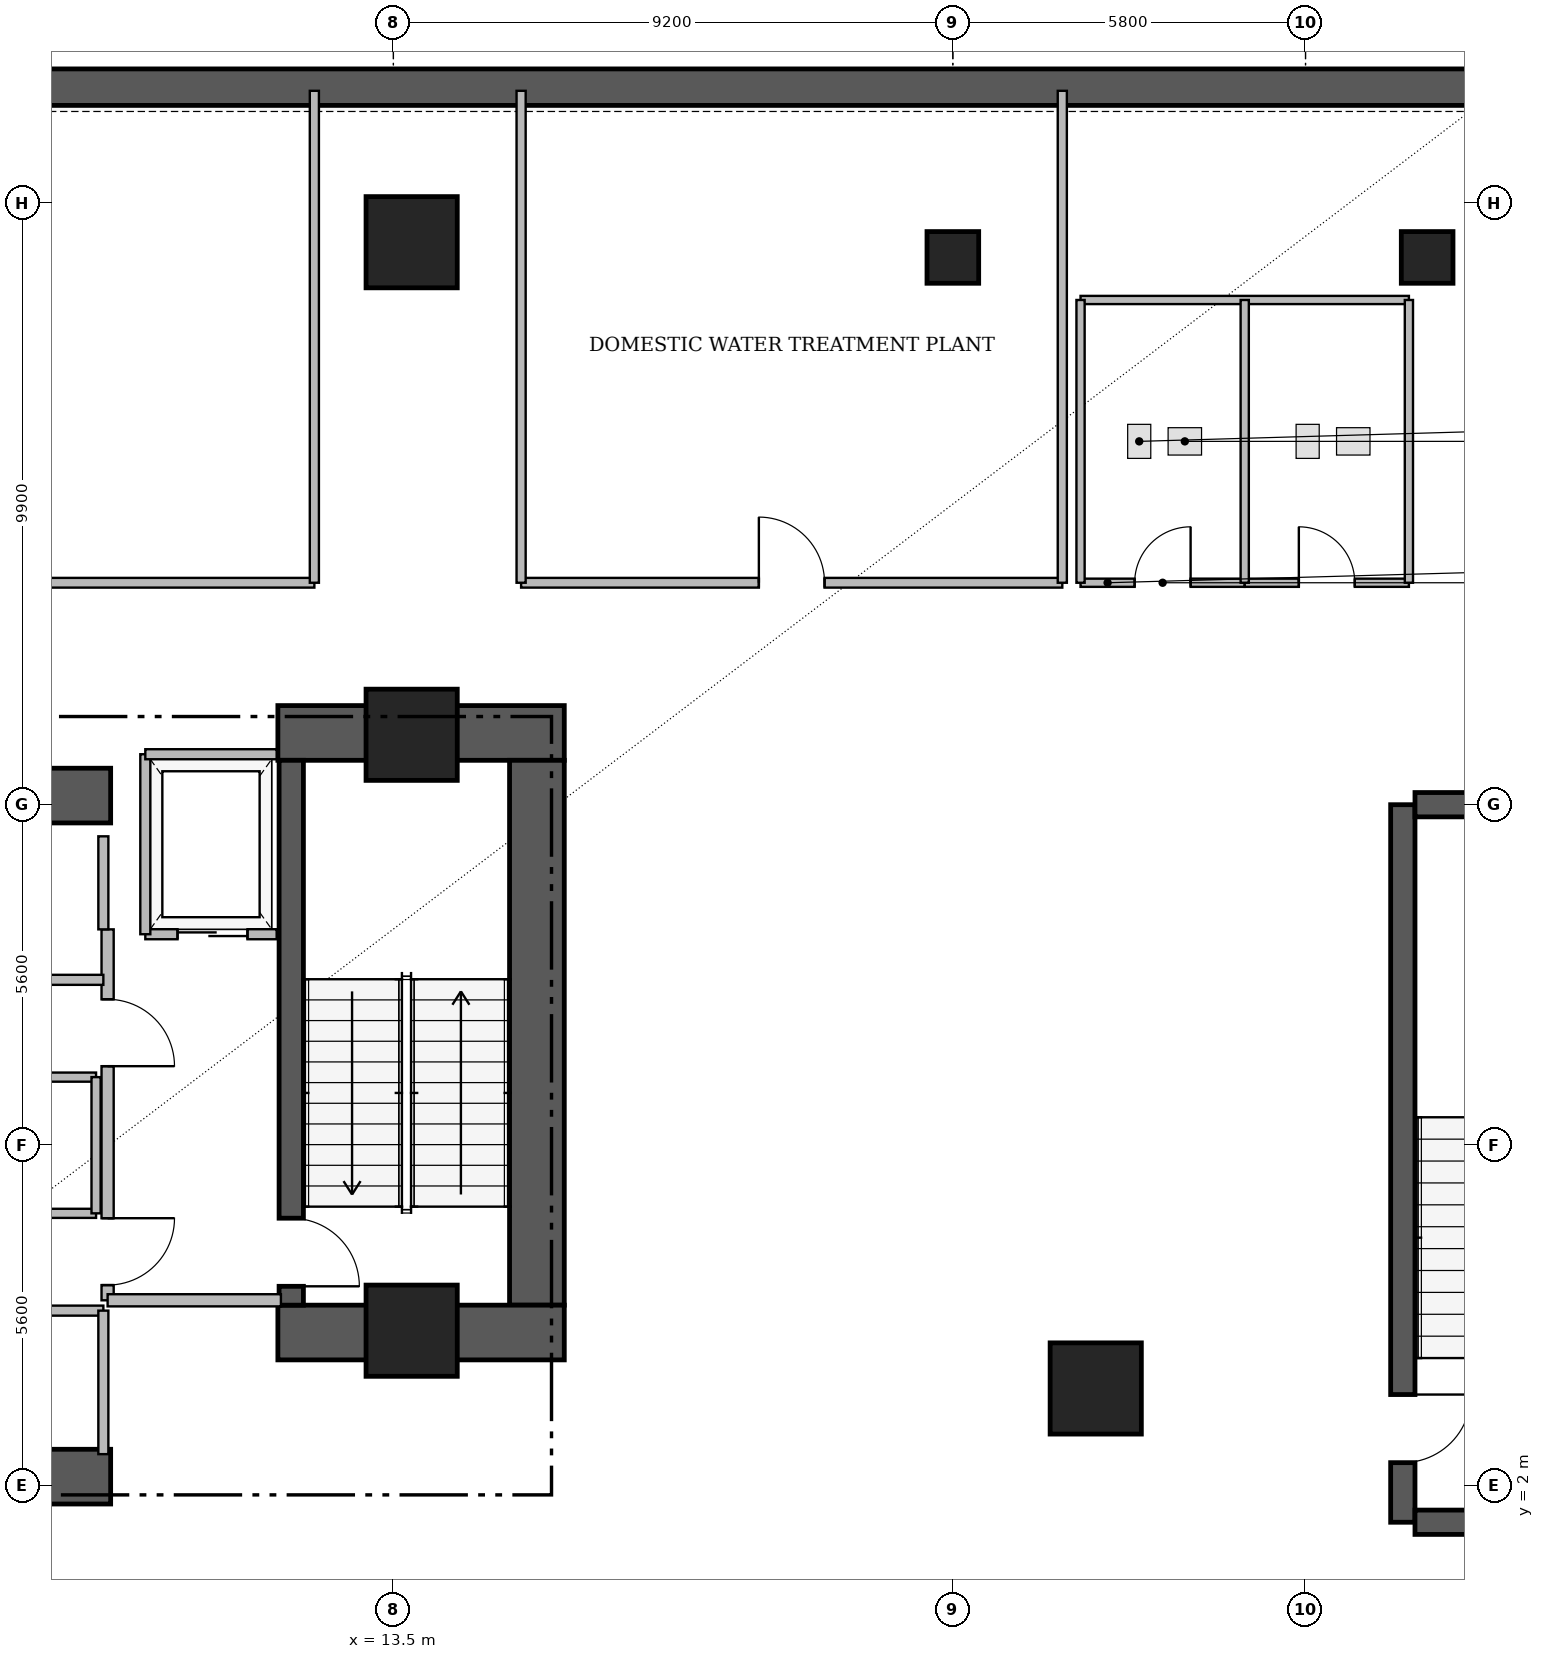
"""IFC4 building model, lengths in metres.
Left out: names, types, materials, properties, quantities, classifications, styles, units other than length and angle.
Written with IfcOpenShell. Run it as: python <this file> out.ifc"""

import sys

from ifc_helpers import new_model, si_unit, direction, frame, frame_2d, origin, origin_2d, place, context, subcontext, project, spatial, rectangle, extrude, element, fill, save


model = new_model("IFC4")
c1 = context("Model", 3, precision=1e-05, world=origin(), true_north=direction((0.0, 1.0)))
c2 = subcontext(c1, "Body", "Model", "MODEL_VIEW")
j1 = project(units=[si_unit("LENGTHUNIT", "METRE"), si_unit("PLANEANGLEUNIT", "RADIAN")], contexts=[c1])
p1 = place(None, origin())
s1 = spatial("IfcSite", under=j1, at=p1, CompositionType="ELEMENT")
p2 = place(p1, origin())
s2 = spatial("IfcBuilding", under=s1, at=p2, CompositionType="ELEMENT")
p3 = place(p2, frame((0.0, 0.0, -9.0)))
s3 = spatial("IfcBuildingStorey", under=s2, at=p3, CompositionType="ELEMENT", Elevation=-9.0)
p4 = place(p3, frame((-36.3, 25.0, 0.0), z_axis=(0.0, 0.0, 1.0), x_axis=(1.0, 0.0, 0.0)))
e1 = element("IfcWall", 1, at=p4, inside=s3, PredefinedType="USERDEFINED", context=c2, shape_type="SweptSolid", body=[
    extrude(rectangle(XDim=72.6, YDim=0.6, at=frame_2d((36.3, 0.0))), origin(), (0.0, 0.0, 1.0), 4.24),
])
p5 = place(p3, frame((11.6, 14.38, 0.0), z_axis=(0.0, 0.0, 1.0), x_axis=(1.0, 0.0, 0.0)))
e2 = element("IfcWall", 2, at=p5, inside=s3, PredefinedType="SHEAR", context=c2, shape_type="SweptSolid", body=[
    extrude(rectangle(XDim=4.71, YDim=0.9, at=frame_2d((2.355, 0.0))), origin(), (0.0, 0.0, 1.0), 4.31),
])
p6 = place(p3, frame((15.86, 4.97, 0.0), z_axis=(0.0, 0.0, 1.0), x_axis=(0.0, 1.0, 0.0)))
e3 = element("IfcWall", 3, at=p6, inside=s3, PredefinedType="SHEAR", context=c2, shape_type="SweptSolid", body=[
    extrude(rectangle(XDim=8.96, YDim=0.9, at=frame_2d((4.48, 0.0))), origin(), (0.0, 0.0, 1.0), 4.31),
])
p7 = place(p3, frame((11.6, 4.52, 0.0), z_axis=(0.0, 0.0, 1.0), x_axis=(1.0, 0.0, 0.0)))
e4 = element("IfcWall", 4, at=p7, inside=s3, PredefinedType="SHEAR", context=c2, shape_type="SweptSolid", body=[
    extrude(rectangle(XDim=4.71, YDim=0.9, at=frame_2d((2.355, 0.0))), origin(), (0.0, 0.0, 1.0), 4.31),
])
for number, where, z_axis, x_axis in (
    (5, (1.25, 2.15, 0.0), (0.0, 0.0, 1.0), (1.0, 0.0, 0.0)),
    (6, (1.25, 13.35, 0.0), (0.0, 0.0, 1.0), (1.0, 0.0, 0.0)),
):
    element("IfcWall", number, at=place(p3, frame(where, z_axis=z_axis, x_axis=x_axis)), inside=s3, PredefinedType="SHEAR", context=c2, shape_type="SweptSolid", body=[
        extrude(rectangle(XDim=7.6, YDim=0.9, at=frame_2d((3.8, 0.0))), origin(), (0.0, 0.0, 1.0), 4.24),
    ])
p8 = place(p3, frame((11.82, 13.93, 0.0), z_axis=(0.0, 0.0, 1.0), x_axis=(0.0, -1.0, 0.0)))
e7 = element("IfcWall", 7, at=p8, inside=s3, PredefinedType="SHEAR", context=c2, shape_type="SweptSolid", body=[
    extrude(rectangle(XDim=8.96, YDim=0.4, at=frame_2d((4.48, 0.0))), origin(), (0.0, 0.0, 1.0), 4.31),
])
p9 = place(p8, frame((7.53, 0.0, 0.0)))
e8 = element("IfcOpeningElement", 8, at=p9, cuts=e7, PredefinedType="OPENING", context=c2, shape_type="SweptSolid", body=[
    extrude(rectangle(XDim=1.12, YDim=2.22, at=frame_2d((0.56, 1.11))), frame((0.0, 0.21, 0.0), z_axis=(0.0, -1.0, 0.0), x_axis=(1.0, 0.0, 0.0)), (0.0, 0.0, 1.0), 0.42),
])
p10 = place(p3, frame((30.1, 13.2, 0.0), z_axis=(0.0, 0.0, 1.0), x_axis=(0.0, -1.0, 0.0)))
e9 = element("IfcWall", 9, at=p10, inside=s3, PredefinedType="SHEAR", context=c2, shape_type="SweptSolid", body=[
    extrude(rectangle(XDim=11.8, YDim=0.4, at=frame_2d((5.9, 0.0))), origin(), (0.0, 0.0, 1.0), 4.31),
])
p11 = place(p10, frame((9.7, 0.0, 0.0)))
e10 = element("IfcOpeningElement", 10, at=p11, cuts=e9, PredefinedType="OPENING", context=c2, shape_type="SweptSolid", body=[
    extrude(rectangle(XDim=1.12, YDim=2.22, at=frame_2d((0.56, 1.11))), frame((0.0, 0.21, 0.0), z_axis=(0.0, -1.0, 0.0), x_axis=(1.0, 0.0, 0.0)), (0.0, 0.0, 1.0), 0.42),
])
for number, where, z_axis, x_axis in (
    (11, (30.3, 1.4, 0.0), (0.0, 0.0, 1.0), (1.0, 0.0, 0.0)),
    (12, (30.3, 13.2, 0.0), (0.0, 0.0, 1.0), (1.0, 0.0, 0.0)),
):
    element("IfcWall", number, at=place(p3, frame(where, z_axis=z_axis, x_axis=x_axis)), inside=s3, PredefinedType="SHEAR", context=c2, shape_type="SweptSolid", body=[
        extrude(rectangle(XDim=5.4, YDim=0.4, at=frame_2d((2.7, 0.0))), origin(), (0.0, 0.0, 1.0), 4.31),
    ])
for number, where, z_axis, x_axis in (
    (13, (13.8, 14.35, 0.0), (0.0, 0.0, 1.0), (1.0, 0.0, 0.0)),
    (14, (13.8, 4.55, 0.0), (0.0, 0.0, 1.0), (1.0, 0.0, 0.0)),
    (15, (13.8, 22.45, 0.0), (0.0, 0.0, 1.0), (1.0, 0.0, 0.0)),
    (16, (25.05, 3.6, 0.0), (0.0, 0.0, 1.0), (1.0, 0.0, 0.0)),
):
    element("IfcColumn", number, at=place(p3, frame(where, z_axis=z_axis, x_axis=x_axis)), inside=s3, PredefinedType="COLUMN", context=c2, shape_type="SweptSolid", body=[
        extrude(rectangle(XDim=1.5, YDim=1.5, at=origin_2d()), origin(), (0.0, 0.0, 1.0), 4.5),
    ])
for number, where, z_axis, x_axis in (
    (17, (30.5, 22.2, 0.0), (0.0, 0.0, 1.0), (1.0, 0.0, 0.0)),
    (18, (22.7, 22.2, 0.0), (0.0, 0.0, 1.0), (1.0, 0.0, 0.0)),
):
    element("IfcColumn", number, at=place(p3, frame(where, z_axis=z_axis, x_axis=x_axis)), inside=s3, PredefinedType="COLUMN", context=c2, shape_type="SweptSolid", body=[
        extrude(rectangle(XDim=0.85, YDim=0.85, at=origin_2d()), origin(), (0.0, 0.0, 1.0), 4.5),
    ])
p12 = place(p3, frame((8.8, 11.15, 0.0), z_axis=(0.0, 0.0, 1.0), x_axis=(0.0, -1.0, 0.0)))
e19 = element("IfcWall", 19, at=p12, inside=s3, PredefinedType="PARTITIONING", context=c2, shape_type="SweptSolid", body=[
    extrude(rectangle(XDim=6.1, YDim=0.2, at=frame_2d((3.05, 0.0))), origin(), (0.0, 0.0, 1.0), 4.24),
])
p13 = place(p12, frame((1.15, 0.0, 0.0)))
e20 = element("IfcOpeningElement", 20, at=p13, cuts=e19, PredefinedType="OPENING", context=c2, shape_type="SweptSolid", body=[
    extrude(rectangle(XDim=1.1, YDim=2.2, at=frame_2d((0.55, 1.1))), frame((0.0, 0.11, 0.0), z_axis=(0.0, -1.0, 0.0), x_axis=(1.0, 0.0, 0.0)), (0.0, 0.0, 1.0), 0.22),
])
p14 = place(p12, frame((4.75, 0.0, 0.0)))
e21 = element("IfcOpeningElement", 21, at=p14, cuts=e19, PredefinedType="OPENING", context=c2, shape_type="SweptSolid", body=[
    extrude(rectangle(XDim=1.1, YDim=2.2, at=frame_2d((0.55, 1.1))), frame((0.0, 0.11, 0.0), z_axis=(0.0, -1.0, 0.0), x_axis=(1.0, 0.0, 0.0)), (0.0, 0.0, 1.0), 0.22),
])
p15 = place(p3, frame((9.42, 11.07, 0.0), z_axis=(0.0, 0.0, 1.0), x_axis=(1.0, 0.0, 0.0)))
e22 = element("IfcWall", 22, at=p15, inside=s3, PredefinedType="PARTITIONING", context=c2, shape_type="SweptSolid", body=[
    extrude(rectangle(XDim=2.16, YDim=0.165, at=frame_2d((1.08, 0.0))), origin(), (0.0, 0.0, 1.0), 4.24),
])
p16 = place(p15, frame((0.53, 0.0, 0.0)))
e23 = element("IfcOpeningElement", 23, at=p16, cuts=e22, PredefinedType="OPENING", context=c2, shape_type="SweptSolid", body=[
    extrude(rectangle(XDim=1.15, YDim=2.25, at=frame_2d((0.575, 1.125))), frame((0.0, 0.093, 0.0), z_axis=(0.0, -1.0, 0.0), x_axis=(1.0, 0.0, 0.0)), (0.0, 0.0, 1.0), 0.185),
])
p17 = place(p3, frame((4.37, 6.48, 0.0), z_axis=(0.0, 0.0, 1.0), x_axis=(1.0, 0.0, 0.0)))
e24 = element("IfcWall", 24, at=p17, inside=s3, PredefinedType="PARTITIONING", context=c2, shape_type="SweptSolid", body=[
    extrude(rectangle(XDim=4.24, YDim=0.15, at=frame_2d((2.12, 0.0))), origin(), (0.0, 0.0, 1.0), 4.24),
])
p18 = place(p17, frame((1.67, 0.0, 0.0)))
e25 = element("IfcOpeningElement", 25, at=p18, cuts=e24, PredefinedType="OPENING", context=c2, shape_type="SweptSolid", body=[
    extrude(rectangle(XDim=0.9, YDim=2.15, at=frame_2d((0.45, 1.075))), frame((0.0, 0.085, 0.0), z_axis=(0.0, -1.0, 0.0), x_axis=(1.0, 0.0, 0.0)), (0.0, 0.0, 1.0), 0.17),
])
p19 = place(p3, frame((0.6, 16.85, 0.0), z_axis=(0.0, 0.0, 1.0), x_axis=(1.0, 0.0, 0.0)))
e26 = element("IfcWall", 26, at=p19, inside=s3, PredefinedType="PARTITIONING", context=c2, shape_type="SweptSolid", body=[
    extrude(rectangle(XDim=11.6, YDim=0.16, at=frame_2d((5.8, 0.0))), origin(), (0.0, 0.0, 1.0), 3.707),
])
p20 = place(p19, frame((5.81, 0.0, 0.0)))
e27 = element("IfcOpeningElement", 27, at=p20, cuts=e26, PredefinedType="OPENING", context=c2, shape_type="SweptSolid", body=[
    extrude(rectangle(XDim=1.08, YDim=2.18, at=frame_2d((0.54, 1.09))), frame((0.0, 0.09, 0.0), z_axis=(0.0, -1.0, 0.0), x_axis=(1.0, 0.0, 0.0)), (0.0, 0.0, 1.0), 0.18),
])
p21 = place(p3, frame((15.6, 16.85, 0.0), z_axis=(0.0, 0.0, 1.0), x_axis=(1.0, 0.0, 0.0)))
e28 = element("IfcWall", 28, at=p21, inside=s3, PredefinedType="PARTITIONING", context=c2, shape_type="SweptSolid", body=[
    extrude(rectangle(XDim=8.9, YDim=0.16, at=frame_2d((4.45, 0.0))), origin(), (0.0, 0.0, 1.0), 4.24),
])
p22 = place(p21, frame((3.91, 0.0, 0.0)))
e29 = element("IfcOpeningElement", 29, at=p22, cuts=e28, PredefinedType="OPENING", context=c2, shape_type="SweptSolid", body=[
    extrude(rectangle(XDim=1.08, YDim=2.18, at=frame_2d((0.54, 1.09))), frame((0.0, 0.09, 0.0), z_axis=(0.0, -1.0, 0.0), x_axis=(1.0, 0.0, 0.0)), (0.0, 0.0, 1.0), 0.18),
])
p23 = place(p3, frame((24.8, 16.85, 0.0), z_axis=(0.0, 0.0, 1.0), x_axis=(1.0, 0.0, 0.0)))
e30 = element("IfcWall", 30, at=p23, inside=s3, PredefinedType="PLUMBINGWALL", context=c2, shape_type="SweptSolid", body=[
    extrude(rectangle(XDim=2.7, YDim=0.135, at=frame_2d((1.35, 0.0))), origin(), (0.0, 0.0, 1.0), 4.24),
])
p24 = place(p23, frame((0.89, 0.0, 0.0)))
e31 = element("IfcOpeningElement", 31, at=p24, cuts=e30, PredefinedType="OPENING", context=c2, shape_type="SweptSolid", body=[
    extrude(rectangle(XDim=0.92, YDim=2.12, at=frame_2d((0.46, 1.06))), frame((0.0, 0.077, 0.0), z_axis=(0.0, -1.0, 0.0), x_axis=(1.0, 0.0, 0.0)), (0.0, 0.0, 1.0), 0.155),
])
p25 = place(p3, frame((27.5, 16.85, 0.0), z_axis=(0.0, 0.0, 1.0), x_axis=(1.0, 0.0, 0.0)))
e32 = element("IfcWall", 32, at=p25, inside=s3, PredefinedType="PLUMBINGWALL", context=c2, shape_type="SweptSolid", body=[
    extrude(rectangle(XDim=2.7, YDim=0.135, at=frame_2d((1.35, 0.0))), origin(), (0.0, 0.0, 1.0), 4.24),
])
p26 = place(p25, frame((0.89, 0.0, 0.0)))
e33 = element("IfcOpeningElement", 33, at=p26, cuts=e32, PredefinedType="OPENING", context=c2, shape_type="SweptSolid", body=[
    extrude(rectangle(XDim=0.92, YDim=2.12, at=frame_2d((0.46, 1.06))), frame((0.0, 0.077, 0.0), z_axis=(0.0, -1.0, 0.0), x_axis=(1.0, 0.0, 0.0)), (0.0, 0.0, 1.0), 0.155),
])
p27 = place(p3, frame((8.8, 5.05, 0.0), z_axis=(0.0, 0.0, 1.0), x_axis=(1.0, 0.0, 0.0)))
e34 = element("IfcWall", 34, at=p27, inside=s3, PredefinedType="PARTITIONING", context=c2, shape_type="SweptSolid", body=[
    extrude(rectangle(XDim=2.85, YDim=0.2, at=frame_2d((1.425, 0.0))), origin(), (0.0, 0.0, 1.0), 4.24),
])
p28 = place(p3, frame((9.42, 11.07, 0.0), z_axis=(0.0, 0.0, 1.0), x_axis=(0.0, 1.0, 0.0)))
e35 = element("IfcWall", 35, at=p28, inside=s3, PredefinedType="PARTITIONING", context=c2, shape_type="SweptSolid", body=[
    extrude(rectangle(XDim=2.96, YDim=0.165, at=frame_2d((1.48, 0.0))), origin(), (0.0, 0.0, 1.0), 4.24),
])
p29 = place(p3, frame((9.42, 14.03, 0.0), z_axis=(0.0, 0.0, 1.0), x_axis=(1.0, 0.0, 0.0)))
e36 = element("IfcWall", 36, at=p29, inside=s3, PredefinedType="PARTITIONING", context=c2, shape_type="SweptSolid", body=[
    extrude(rectangle(XDim=2.16, YDim=0.165, at=frame_2d((1.08, 0.0))), origin(), (0.0, 0.0, 1.0), 4.24),
])
p30 = place(p3, frame((6.25, 4.88, 0.0), z_axis=(0.0, 0.0, 1.0), x_axis=(1.0, 0.0, 0.0)))
e37 = element("IfcWall", 37, at=p30, inside=s3, PredefinedType="PARTITIONING", context=c2, shape_type="SweptSolid", body=[
    extrude(rectangle(XDim=2.48, YDim=0.165, at=frame_2d((1.24, 0.0))), origin(), (0.0, 0.0, 1.0), 4.24),
])
p31 = place(p3, frame((8.73, 2.52, 0.0), z_axis=(0.0, 0.0, 1.0), x_axis=(0.0, 1.0, 0.0)))
e38 = element("IfcWall", 38, at=p31, inside=s3, PredefinedType="PARTITIONING", context=c2, shape_type="SweptSolid", body=[
    extrude(rectangle(XDim=2.36, YDim=0.165, at=frame_2d((1.18, 0.0))), origin(), (0.0, 0.0, 1.0), 4.24),
])
p32 = place(p3, frame((6.25, 10.32, 0.0), z_axis=(0.0, 0.0, 1.0), x_axis=(1.0, 0.0, 0.0)))
e39 = element("IfcWall", 39, at=p32, inside=s3, PredefinedType="PARTITIONING", context=c2, shape_type="SweptSolid", body=[
    extrude(rectangle(XDim=2.48, YDim=0.165, at=frame_2d((1.24, 0.0))), origin(), (0.0, 0.0, 1.0), 4.24),
])
p33 = place(p3, frame((8.73, 11.15, 0.0), z_axis=(0.0, 0.0, 1.0), x_axis=(0.0, 1.0, 0.0)))
e40 = element("IfcWall", 40, at=p33, inside=s3, PredefinedType="PARTITIONING", context=c2, shape_type="SweptSolid", body=[
    extrude(rectangle(XDim=1.53, YDim=0.165, at=frame_2d((0.765, 0.0))), origin(), (0.0, 0.0, 1.0), 4.24),
])
p34 = place(p3, frame((4.37, 8.72, 0.0), z_axis=(0.0, 0.0, 1.0), x_axis=(1.0, 0.0, 0.0)))
e41 = element("IfcWall", 41, at=p34, inside=s3, PredefinedType="PARTITIONING", context=c2, shape_type="SweptSolid", body=[
    extrude(rectangle(XDim=4.24, YDim=0.15, at=frame_2d((2.12, 0.0))), origin(), (0.0, 0.0, 1.0), 4.24),
])
p35 = place(p3, frame((8.61, 6.48, 0.0), z_axis=(0.0, 0.0, 1.0), x_axis=(0.0, 1.0, 0.0)))
e42 = element("IfcWall", 42, at=p35, inside=s3, PredefinedType="PARTITIONING", context=c2, shape_type="SweptSolid", body=[
    extrude(rectangle(XDim=2.24, YDim=0.15, at=frame_2d((1.12, 0.0))), origin(), (0.0, 0.0, 1.0), 4.24),
])
for number, where, z_axis, x_axis in (
    (43, (12.2, 16.85, 0.0), (0.0, 0.0, 1.0), (0.0, 1.0, 0.0)),
    (44, (15.6, 16.85, 0.0), (0.0, 0.0, 1.0), (0.0, 1.0, 0.0)),
    (45, (24.5, 16.85, 0.0), (0.0, 0.0, 1.0), (0.0, 1.0, 0.0)),
):
    element("IfcWall", number, at=place(p3, frame(where, z_axis=z_axis, x_axis=x_axis)), inside=s3, PredefinedType="PARTITIONING", context=c2, shape_type="SweptSolid", body=[
        extrude(rectangle(XDim=8.09, YDim=0.15, at=frame_2d((4.045, 0.0))), origin(), (0.0, 0.0, 1.0), 4.24),
    ])
p36 = place(p3, frame((24.8, 21.5, 0.0), z_axis=(0.0, 0.0, 1.0), x_axis=(1.0, 0.0, 0.0)))
e46 = element("IfcWall", 46, at=p36, inside=s3, PredefinedType="PLUMBINGWALL", context=c2, shape_type="SweptSolid", body=[
    extrude(rectangle(XDim=5.4, YDim=0.135, at=frame_2d((2.7, 0.0))), origin(), (0.0, 0.0, 1.0), 4.24),
])
for number, where, z_axis, x_axis in (
    (47, (24.8, 16.85, 0.0), (0.0, 0.0, 1.0), (0.0, 1.0, 0.0)),
    (48, (30.2, 16.85, 0.0), (0.0, 0.0, 1.0), (0.0, 1.0, 0.0)),
    (49, (27.5, 16.85, 0.0), (0.0, 0.0, 1.0), (0.0, 1.0, 0.0)),
):
    element("IfcWall", number, at=place(p3, frame(where, z_axis=z_axis, x_axis=x_axis)), inside=s3, PredefinedType="PLUMBINGWALL", context=c2, shape_type="SweptSolid", body=[
        extrude(rectangle(XDim=4.65, YDim=0.135, at=frame_2d((2.325, 0.0))), origin(), (0.0, 0.0, 1.0), 4.24),
    ])
p37 = place(p9, origin())
e50 = element("IfcDoor", 50, at=p37, inside=s3, OperationType="SINGLE_SWING_RIGHT", PredefinedType="DOOR", context=c2, shape_type="SweptSolid", body=[
    extrude(rectangle(XDim=1.12, YDim=2.22, at=frame_2d((0.56, 1.11))), frame((0.0, 0.025, 0.0), z_axis=(0.0, -1.0, 0.0), x_axis=(1.0, 0.0, 0.0)), (0.0, 0.0, 1.0), 0.05),
])
fill(e8, e50)
p38 = place(p11, origin())
e51 = element("IfcDoor", 51, at=p38, inside=s3, OperationType="SINGLE_SWING_LEFT", PredefinedType="DOOR", context=c2, shape_type="SweptSolid", body=[
    extrude(rectangle(XDim=1.12, YDim=2.22, at=frame_2d((0.56, 1.11))), frame((0.0, 0.025, 0.0), z_axis=(0.0, -1.0, 0.0), x_axis=(1.0, 0.0, 0.0)), (0.0, 0.0, 1.0), 0.05),
])
fill(e10, e51)
p39 = place(p13, origin())
e52 = element("IfcDoor", 52, at=p39, inside=s3, OperationType="SINGLE_SWING_RIGHT", PredefinedType="DOOR", context=c2, shape_type="SweptSolid", body=[
    extrude(rectangle(XDim=1.1, YDim=2.2, at=frame_2d((0.55, 1.1))), frame((0.0, 0.025, 0.0), z_axis=(0.0, -1.0, 0.0), x_axis=(1.0, 0.0, 0.0)), (0.0, 0.0, 1.0), 0.05),
])
fill(e20, e52)
p40 = place(p14, origin())
e53 = element("IfcDoor", 53, at=p40, inside=s3, OperationType="SINGLE_SWING_LEFT", PredefinedType="DOOR", context=c2, shape_type="SweptSolid", body=[
    extrude(rectangle(XDim=1.1, YDim=2.2, at=frame_2d((0.55, 1.1))), frame((0.0, 0.025, 0.0), z_axis=(0.0, -1.0, 0.0), x_axis=(1.0, 0.0, 0.0)), (0.0, 0.0, 1.0), 0.05),
])
fill(e21, e53)
p41 = place(p16, origin())
e54 = element("IfcDoor", 54, at=p41, inside=s3, OperationType="SLIDING_TO_LEFT", PredefinedType="DOOR", context=c2, shape_type="SweptSolid", body=[
    extrude(rectangle(XDim=1.15, YDim=2.25, at=frame_2d((0.575, 1.125))), frame((0.0, 0.025, 0.0), z_axis=(0.0, -1.0, 0.0), x_axis=(1.0, 0.0, 0.0)), (0.0, 0.0, 1.0), 0.05),
])
fill(e23, e54)
p42 = place(p22, origin())
e55 = element("IfcDoor", 55, at=p42, inside=s3, OperationType="SINGLE_SWING_LEFT", PredefinedType="DOOR", context=c2, shape_type="SweptSolid", body=[
    extrude(rectangle(XDim=1.08, YDim=2.18, at=frame_2d((0.54, 1.09))), frame((0.0, 0.025, 0.0), z_axis=(0.0, -1.0, 0.0), x_axis=(1.0, 0.0, 0.0)), (0.0, 0.0, 1.0), 0.05),
])
fill(e29, e55)
p43 = place(p24, origin())
e56 = element("IfcDoor", 56, at=p43, inside=s3, OperationType="SINGLE_SWING_RIGHT", PredefinedType="DOOR", context=c2, shape_type="SweptSolid", body=[
    extrude(rectangle(XDim=0.92, YDim=2.12, at=frame_2d((0.46, 1.06))), frame((0.0, 0.025, 0.0), z_axis=(0.0, -1.0, 0.0), x_axis=(1.0, 0.0, 0.0)), (0.0, 0.0, 1.0), 0.05),
])
fill(e31, e56)
p44 = place(p26, origin())
e57 = element("IfcDoor", 57, at=p44, inside=s3, OperationType="SINGLE_SWING_LEFT", PredefinedType="DOOR", context=c2, shape_type="SweptSolid", body=[
    extrude(rectangle(XDim=0.92, YDim=2.12, at=frame_2d((0.46, 1.06))), frame((0.0, 0.025, 0.0), z_axis=(0.0, -1.0, 0.0), x_axis=(1.0, 0.0, 0.0)), (0.0, 0.0, 1.0), 0.05),
])
fill(e33, e57)
save(model, sys.argv[1])
